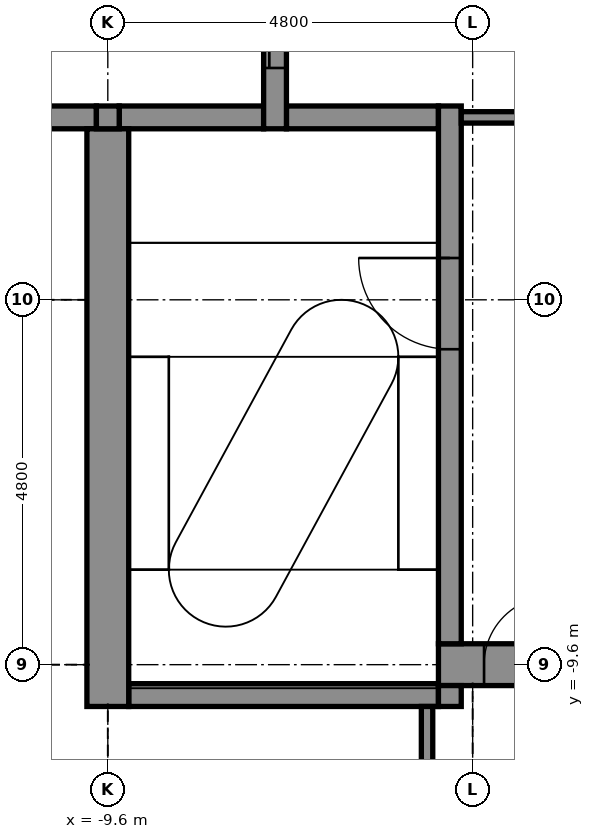
"""IFC4 building model, lengths in metres.
Left out: names, types, materials, properties, quantities, classifications, styles, units other than length and angle.
Written with IfcOpenShell. Run it as: python <this file> out.ifc"""

import sys

from ifc_helpers import new_model, si_unit, direction, frame, frame_2d, origin, place, context, subcontext, project, spatial, rectangle, extrude, element, fill, save


model = new_model("IFC4")
c1 = context("Model", 3, precision=1e-05, world=origin(), true_north=direction((0.0, 1.0)))
c2 = subcontext(c1, "Body", "Model", "MODEL_VIEW")
j1 = project(units=[si_unit("LENGTHUNIT", "METRE"), si_unit("PLANEANGLEUNIT", "RADIAN")], contexts=[c1])
p1 = place(None, origin())
s1 = spatial("IfcSite", under=j1, at=p1, CompositionType="ELEMENT")
p2 = place(p1, origin())
s2 = spatial("IfcBuilding", under=s1, at=p2, CompositionType="ELEMENT")
p3 = place(p2, frame((0.0, 0.0, 289.1)))
s3 = spatial("IfcBuildingStorey", under=s2, at=p3, CompositionType="ELEMENT", Elevation=289.1)
p4 = place(p3, frame((-9.325, -10.0, -0.15), z_axis=(0.0, 0.0, 1.0), x_axis=(1.0, 0.0, 0.0)))
e1 = element("IfcWall", 1, at=p4, inside=s3, PredefinedType="STANDARD", context=c2, shape_type="SweptSolid", body=[
    extrude(rectangle(XDim=4.075, YDim=0.3, at=frame_2d((2.038, 0.0))), origin(), (0.0, 0.0, 1.0), 3.9),
])
p5 = place(p3, frame((-5.25, -9.6, -0.15), z_axis=(0.0, 0.0, 1.0), x_axis=(1.0, 0.0, 0.0)))
e2 = element("IfcWall", 2, at=p5, inside=s3, PredefinedType="SHEAR", context=c2, shape_type="SweptSolid", body=[
    extrude(rectangle(XDim=10.2, YDim=0.55, at=frame_2d((5.1, 0.0))), origin(), (0.0, 0.0, 1.0), 3.9),
])
p6 = place(p5, frame((0.6, 0.0, 0.15)))
e3 = element("IfcOpeningElement", 3, at=p6, cuts=e2, PredefinedType="OPENING", context=c2, shape_type="SweptSolid", body=[
    extrude(rectangle(XDim=0.9, YDim=2.1, at=frame_2d((0.45, 1.05))), frame((0.0, 0.285, 0.0), z_axis=(0.0, -1.0, 0.0), x_axis=(1.0, 0.0, 0.0)), (0.0, 0.0, 1.0), 0.57),
])
p7 = place(p3, frame((-10.85, -2.4, -0.15), z_axis=(0.0, 0.0, 1.0), x_axis=(1.0, 0.0, 0.0)))
e4 = element("IfcWall", 4, at=p7, inside=s3, PredefinedType="STANDARD", context=c2, shape_type="SweptSolid", body=[
    extrude(rectangle(XDim=1.1, YDim=0.3, at=frame_2d((0.55, 0.0))), origin(), (0.0, 0.0, 1.0), 3.9),
])
p8 = place(p3, frame((-9.45, -2.4, -0.15), z_axis=(0.0, 0.0, 1.0), x_axis=(1.0, 0.0, 0.0)))
e5 = element("IfcWall", 5, at=p8, inside=s3, PredefinedType="STANDARD", context=c2, shape_type="SweptSolid", body=[
    extrude(rectangle(XDim=1.9, YDim=0.3, at=frame_2d((0.95, 0.0))), origin(), (0.0, 0.0, 1.0), 3.9),
])
p9 = place(p3, frame((-7.25, -2.4, -0.15), z_axis=(0.0, 0.0, 1.0), x_axis=(1.0, 0.0, 0.0)))
e6 = element("IfcWall", 6, at=p9, inside=s3, PredefinedType="STANDARD", context=c2, shape_type="SweptSolid", body=[
    extrude(rectangle(XDim=2.0, YDim=0.3, at=frame_2d((1.0, 0.0))), origin(), (0.0, 0.0, 1.0), 3.9),
])
p10 = place(p3, frame((-9.6, -10.15, -0.15), z_axis=(0.0, 0.0, 1.0), x_axis=(0.0, 1.0, 0.0)))
e7 = element("IfcWall", 7, at=p10, inside=s3, PredefinedType="SHEAR", context=c2, shape_type="SweptSolid", body=[
    extrude(rectangle(XDim=7.6, YDim=0.55, at=frame_2d((3.8, 0.0))), origin(), (0.0, 0.0, 1.0), 3.9),
])
p11 = place(p3, frame((-9.6, -2.55, -0.15), z_axis=(0.0, 0.0, 1.0), x_axis=(0.0, 1.0, 0.0)))
e8 = element("IfcWall", 8, at=p11, inside=s3, PredefinedType="STANDARD", context=c2, shape_type="SweptSolid", body=[
    extrude(rectangle(XDim=0.3, YDim=0.3, at=frame_2d((0.15, 0.0))), origin(), (0.0, 0.0, 1.0), 3.9),
])
p12 = place(p3, frame((-7.4, -2.55, -0.15), z_axis=(0.0, 0.0, 1.0), x_axis=(0.0, 1.0, 0.0)))
e9 = element("IfcWall", 9, at=p12, inside=s3, PredefinedType="STANDARD", context=c2, shape_type="SweptSolid", body=[
    extrude(rectangle(XDim=5.1, YDim=0.3, at=frame_2d((2.55, 0.0))), origin(), (0.0, 0.0, 1.0), 3.9),
])
p13 = place(p12, frame((0.8, 0.0, 0.15)))
e10 = element("IfcOpeningElement", 10, at=p13, cuts=e9, PredefinedType="OPENING", context=c2, shape_type="SweptSolid", body=[
    extrude(rectangle(XDim=1.1, YDim=2.1, at=frame_2d((0.55, 1.05))), frame((0.0, 0.16, 0.0), z_axis=(0.0, -1.0, 0.0), x_axis=(1.0, 0.0, 0.0)), (0.0, 0.0, 1.0), 0.32),
])
p14 = place(p12, frame((3.2, 0.0, 0.15)))
e11 = element("IfcOpeningElement", 11, at=p14, cuts=e9, PredefinedType="OPENING", context=c2, shape_type="SweptSolid", body=[
    extrude(rectangle(XDim=1.1, YDim=2.1, at=frame_2d((0.55, 1.05))), frame((0.0, 0.16, 0.0), z_axis=(0.0, -1.0, 0.0), x_axis=(1.0, 0.0, 0.0)), (0.0, 0.0, 1.0), 0.32),
])
p15 = place(p3, frame((-5.1, -10.15, -0.15), z_axis=(0.0, 0.0, 1.0), x_axis=(0.0, 1.0, 0.0)))
e12 = element("IfcWall", 12, at=p15, inside=s3, PredefinedType="STANDARD", context=c2, shape_type="SweptSolid", body=[
    extrude(rectangle(XDim=0.275, YDim=0.3, at=frame_2d((0.137, 0.0))), origin(), (0.0, 0.0, 1.0), 3.9),
])
p16 = place(p3, frame((-5.1, -9.325, -0.15), z_axis=(0.0, 0.0, 1.0), x_axis=(0.0, 1.0, 0.0)))
e13 = element("IfcWall", 13, at=p16, inside=s3, PredefinedType="STANDARD", context=c2, shape_type="SweptSolid", body=[
    extrude(rectangle(XDim=7.075, YDim=0.3, at=frame_2d((3.538, 0.0))), origin(), (0.0, 0.0, 1.0), 3.9),
])
p17 = place(p16, frame((3.875, 0.0, 0.15)))
e14 = element("IfcOpeningElement", 14, at=p17, cuts=e13, PredefinedType="OPENING", context=c2, shape_type="SweptSolid", body=[
    extrude(rectangle(XDim=1.2, YDim=2.1, at=frame_2d((0.6, 1.05))), frame((0.0, 0.16, 0.0), z_axis=(0.0, -1.0, 0.0), x_axis=(1.0, 0.0, 0.0)), (0.0, 0.0, 1.0), 0.32),
])
p18 = place(p3, frame((-5.4, -13.0, 0.0), z_axis=(0.0, 0.0, 1.0), x_axis=(0.0, 1.0, 0.0)))
e15 = element("IfcWall", 15, at=p18, inside=s3, PredefinedType="PARTITIONING", context=c2, shape_type="SweptSolid", body=[
    extrude(rectangle(XDim=2.85, YDim=0.15, at=frame_2d((1.425, 0.0))), origin(), (0.0, 0.0, 1.0), 3.75),
])
p19 = place(p3, frame((-4.95, -2.4, 0.0), z_axis=(0.0, 0.0, 1.0), x_axis=(1.0, 0.0, 0.0)))
e16 = element("IfcWall", 16, at=p19, inside=s3, PredefinedType="PARTITIONING", context=c2, shape_type="SweptSolid", body=[
    extrude(rectangle(XDim=1.2, YDim=0.15, at=frame_2d((0.6, 0.0))), origin(), (0.0, 0.0, 1.0), 3.75),
])
p20 = place(p13, origin())
e17 = element("IfcDoor", 17, at=p20, inside=s3, OperationType="DOUBLE_DOOR_SLIDING", PredefinedType="DOOR", context=c2, shape_type="SweptSolid", body=[
    extrude(rectangle(XDim=1.1, YDim=2.1, at=frame_2d((0.55, 1.05))), frame((0.0, 0.025, 0.0), z_axis=(0.0, -1.0, 0.0), x_axis=(1.0, 0.0, 0.0)), (0.0, 0.0, 1.0), 0.05),
])
fill(e10, e17)
p21 = place(p17, origin())
e18 = element("IfcDoor", 18, at=p21, inside=s3, OperationType="SINGLE_SWING_RIGHT", PredefinedType="DOOR", context=c2, shape_type="SweptSolid", body=[
    extrude(rectangle(XDim=1.2, YDim=2.1, at=frame_2d((0.6, 1.05))), frame((0.0, 0.025, 0.0), z_axis=(0.0, -1.0, 0.0), x_axis=(1.0, 0.0, 0.0)), (0.0, 0.0, 1.0), 0.05),
])
fill(e14, e18)
p22 = place(p6, origin())
e19 = element("IfcDoor", 19, at=p22, inside=s3, OperationType="SINGLE_SWING_RIGHT", PredefinedType="DOOR", context=c2, shape_type="SweptSolid", body=[
    extrude(rectangle(XDim=0.9, YDim=2.1, at=frame_2d((0.45, 1.05))), frame((0.0, 0.025, 0.0), z_axis=(0.0, -1.0, 0.0), x_axis=(1.0, 0.0, 0.0)), (0.0, 0.0, 1.0), 0.05),
])
fill(e3, e19)
save(model, sys.argv[1])
